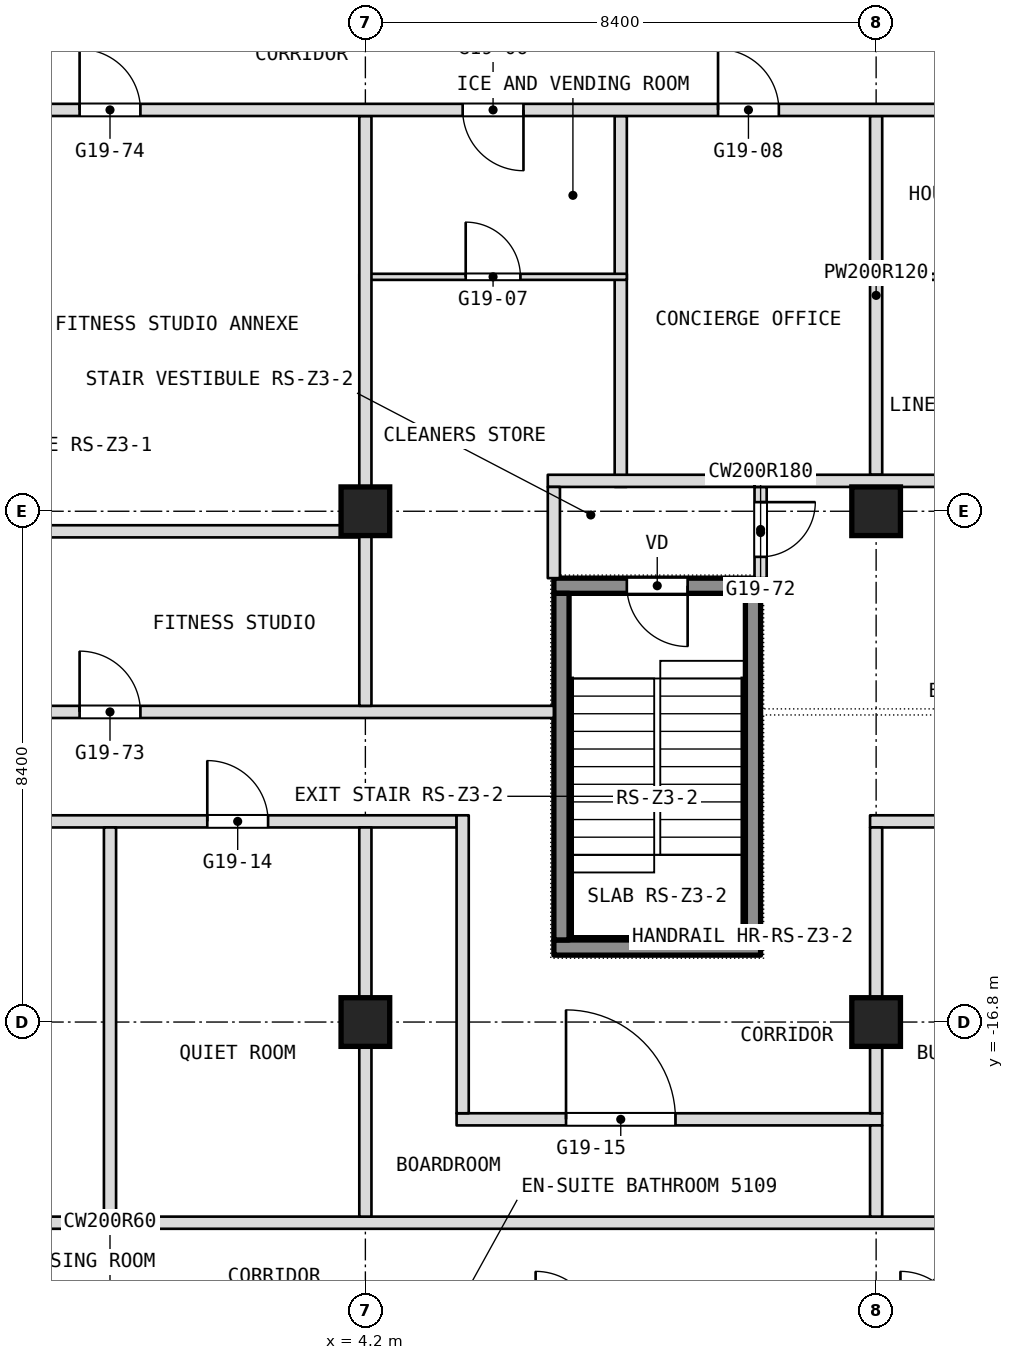
"""IFC4 building model, lengths in metres.
Left out: names, types, materials, properties, quantities, classifications, styles, units other than length and angle.
Written with IfcOpenShell. Run it as: python <this file> out.ifc"""

import sys

from ifc_helpers import new_model, si_unit, direction, frame, frame_2d, origin, origin_2d, place, context, subcontext, project, spatial, rectangle, extrude, element, fill, save


model = new_model("IFC4")
c1 = context("Model", 3, precision=1e-05, world=origin(), true_north=direction((0.0, 1.0)))
c2 = subcontext(c1, "Body", "Model", "MODEL_VIEW")
j1 = project(units=[si_unit("LENGTHUNIT", "METRE"), si_unit("PLANEANGLEUNIT", "RADIAN")], contexts=[c1])
p1 = place(None, origin())
s1 = spatial("IfcSite", under=j1, at=p1, CompositionType="ELEMENT")
p2 = place(p1, origin())
s2 = spatial("IfcBuilding", under=s1, at=p2, CompositionType="ELEMENT")
p3 = place(p2, frame((0.0, 0.0, 220.1)))
s3 = spatial("IfcBuildingStorey", under=s2, at=p3, CompositionType="ELEMENT", Elevation=220.1)
for number, where, z_axis, x_axis in (
    (1, (4.2, -16.8, 0.0), (0.0, 0.0, 1.0), (1.0, 0.0, 0.0)),
    (2, (4.2, -8.4, 0.0), (0.0, 0.0, 1.0), (1.0, 0.0, 0.0)),
    (3, (12.6, -16.8, 0.0), (0.0, 0.0, 1.0), (1.0, 0.0, 0.0)),
    (4, (12.6, -8.4, 0.0), (0.0, 0.0, 1.0), (1.0, 0.0, 0.0)),
):
    element("IfcColumn", number, at=place(p3, frame(where, z_axis=z_axis, x_axis=x_axis)), inside=s3, PredefinedType="COLUMN", context=c2, shape_type="SweptSolid", body=[
        extrude(rectangle(XDim=0.8, YDim=0.8, at=origin_2d()), origin(), (0.0, 0.0, 1.0), 3.6),
    ])
p4 = place(p3, frame((-16.7, -20.1, 0.0), z_axis=(0.0, 0.0, 1.0), x_axis=(1.0, 0.0, 0.0)))
e5 = element("IfcWall", 5, at=p4, inside=s3, PredefinedType="PARTITIONING", context=c2, shape_type="SweptSolid", body=[
    extrude(rectangle(XDim=33.4, YDim=0.2, at=frame_2d((16.7, 0.0))), origin(), (0.0, 0.0, 1.0), 3.34),
])
p5 = place(p3, frame((5.7, -18.4, 0.0), z_axis=(0.0, 0.0, 1.0), x_axis=(1.0, 0.0, 0.0)))
e6 = element("IfcWall", 6, at=p5, inside=s3, PredefinedType="PARTITIONING", context=c2, shape_type="SweptSolid", body=[
    extrude(rectangle(XDim=7.0, YDim=0.2, at=frame_2d((3.5, 0.0))), origin(), (0.0, 0.0, 1.0), 3.34),
])
p6 = place(p5, frame((1.8, 0.0, 0.0)))
e7 = element("IfcOpeningElement", 7, at=p6, cuts=e6, PredefinedType="OPENING", context=c2, shape_type="SweptSolid", body=[
    extrude(rectangle(XDim=1.8, YDim=2.1, at=frame_2d((0.9, 1.05))), frame((0.0, 0.1, 0.0), z_axis=(0.0, -1.0, 0.0), x_axis=(1.0, 0.0, 0.0)), (0.0, 0.0, 1.0), 0.2),
])
p7 = place(p3, frame((-5.9, -13.5, 0.0), z_axis=(0.0, 0.0, 1.0), x_axis=(1.0, 0.0, 0.0)))
e8 = element("IfcWall", 8, at=p7, inside=s3, PredefinedType="PARTITIONING", context=c2, shape_type="SweptSolid", body=[
    extrude(rectangle(XDim=11.6, YDim=0.2, at=frame_2d((5.8, 0.0))), origin(), (0.0, 0.0, 1.0), 3.34),
])
p8 = place(p7, frame((3.3, 0.0, 0.0)))
e9 = element("IfcOpeningElement", 9, at=p8, cuts=e8, PredefinedType="OPENING", context=c2, shape_type="SweptSolid", body=[
    extrude(rectangle(XDim=1.0, YDim=2.1, at=frame_2d((0.5, 1.05))), frame((0.0, 0.1, 0.0), z_axis=(0.0, -1.0, 0.0), x_axis=(1.0, 0.0, 0.0)), (0.0, 0.0, 1.0), 0.2),
])
p9 = place(p7, frame((7.5, 0.0, 0.0)))
e10 = element("IfcOpeningElement", 10, at=p9, cuts=e8, PredefinedType="OPENING", context=c2, shape_type="SweptSolid", body=[
    extrude(rectangle(XDim=1.0, YDim=2.1, at=frame_2d((0.5, 1.05))), frame((0.0, 0.1, 0.0), z_axis=(0.0, -1.0, 0.0), x_axis=(1.0, 0.0, 0.0)), (0.0, 0.0, 1.0), 0.2),
])
p10 = place(p3, frame((12.5, -13.5, 0.0), z_axis=(0.0, 0.0, 1.0), x_axis=(1.0, 0.0, 0.0)))
e11 = element("IfcWall", 11, at=p10, inside=s3, PredefinedType="PARTITIONING", context=c2, shape_type="SweptSolid", body=[
    extrude(rectangle(XDim=4.2, YDim=0.2, at=frame_2d((2.1, 0.0))), origin(), (0.0, 0.0, 1.0), 3.34),
])
p11 = place(p10, frame((1.7, 0.0, 0.0)))
e12 = element("IfcOpeningElement", 12, at=p11, cuts=e11, PredefinedType="OPENING", context=c2, shape_type="SweptSolid", body=[
    extrude(rectangle(XDim=1.0, YDim=2.1, at=frame_2d((0.5, 1.05))), frame((0.0, 0.1, 0.0), z_axis=(0.0, -1.0, 0.0), x_axis=(1.0, 0.0, 0.0)), (0.0, 0.0, 1.0), 0.2),
])
p12 = place(p3, frame((12.6, -20.0, 0.0), z_axis=(0.0, 0.0, 1.0), x_axis=(0.0, 1.0, 0.0)))
e13 = element("IfcWall", 13, at=p12, inside=s3, PredefinedType="PARTITIONING", context=c2, shape_type="SweptSolid", body=[
    extrude(rectangle(XDim=1.5, YDim=0.2, at=frame_2d((0.75, 0.0))), origin(), (0.0, 0.0, 1.0), 3.34),
])
p13 = place(p3, frame((12.6, -7.8, 0.0), z_axis=(0.0, 0.0, 1.0), x_axis=(0.0, 1.0, 0.0)))
e14 = element("IfcWall", 14, at=p13, inside=s3, PredefinedType="PARTITIONING", context=c2, shape_type="SweptSolid", body=[
    extrude(rectangle(XDim=5.9, YDim=0.2, at=frame_2d((2.95, 0.0))), origin(), (0.0, 0.0, 1.0), 3.34),
])
p14 = place(p3, frame((12.6, -18.3, 0.0), z_axis=(0.0, 0.0, 1.0), x_axis=(0.0, 1.0, 0.0)))
e15 = element("IfcWall", 15, at=p14, inside=s3, PredefinedType="PARTITIONING", context=c2, shape_type="SweptSolid", body=[
    extrude(rectangle(XDim=4.7, YDim=0.2, at=frame_2d((2.35, 0.0))), origin(), (0.0, 0.0, 1.0), 3.34),
])
p15 = place(p3, frame((-7.3, -11.7, 0.0), z_axis=(0.0, 0.0, 1.0), x_axis=(1.0, 0.0, 0.0)))
e16 = element("IfcWall", 16, at=p15, inside=s3, PredefinedType="PARTITIONING", context=c2, shape_type="SweptSolid", body=[
    extrude(rectangle(XDim=14.6, YDim=0.2, at=frame_2d((7.3, 0.0))), origin(), (0.0, 0.0, 1.0), 3.34),
])
p16 = place(p15, frame((6.8, 0.0, 0.0)))
e17 = element("IfcOpeningElement", 17, at=p16, cuts=e16, PredefinedType="OPENING", context=c2, shape_type="SweptSolid", body=[
    extrude(rectangle(XDim=1.0, YDim=2.1, at=frame_2d((0.5, 1.05))), frame((0.0, 0.1, 0.0), z_axis=(0.0, -1.0, 0.0), x_axis=(1.0, 0.0, 0.0)), (0.0, 0.0, 1.0), 0.2),
])
p17 = place(p3, frame((10.7, -9.5, 0.0), z_axis=(0.0, 0.0, 1.0), x_axis=(0.0, 1.0, 0.0)))
e18 = element("IfcWall", 18, at=p17, inside=s3, PredefinedType="PARTITIONING", context=c2, shape_type="SweptSolid", body=[
    extrude(rectangle(XDim=1.5, YDim=0.2, at=frame_2d((0.75, 0.0))), origin(), (0.0, 0.0, 1.0), 3.34),
])
p18 = place(p17, frame((0.35, 0.0, 0.0)))
e19 = element("IfcOpeningElement", 19, at=p18, cuts=e18, PredefinedType="OPENING", context=c2, shape_type="SweptSolid", body=[
    extrude(rectangle(XDim=0.9, YDim=2.1, at=frame_2d((0.45, 1.05))), frame((0.0, 0.1, 0.0), z_axis=(0.0, -1.0, 0.0), x_axis=(1.0, 0.0, 0.0)), (0.0, 0.0, 1.0), 0.2),
])
p19 = place(p3, frame((-4.1, -8.73, 0.0), z_axis=(0.0, 0.0, 1.0), x_axis=(1.0, 0.0, 0.0)))
e20 = element("IfcWall", 20, at=p19, inside=s3, PredefinedType="PARTITIONING", context=c2, shape_type="SweptSolid", body=[
    extrude(rectangle(XDim=8.2, YDim=0.2, at=frame_2d((4.1, 0.0))), origin(), (0.0, 0.0, 1.0), 3.34),
])
p20 = place(p3, frame((8.4, -8.0, 0.0), z_axis=(0.0, 0.0, 1.0), x_axis=(0.0, 1.0, 0.0)))
e21 = element("IfcWall", 21, at=p20, inside=s3, PredefinedType="PARTITIONING", context=c2, shape_type="SweptSolid", body=[
    extrude(rectangle(XDim=6.1, YDim=0.2, at=frame_2d((3.05, 0.0))), origin(), (0.0, 0.0, 1.0), 3.34),
])
p21 = place(p3, frame((10.6, -7.9, 0.0), z_axis=(0.0, 0.0, 1.0), x_axis=(1.0, 0.0, 0.0)))
e22 = element("IfcWall", 22, at=p21, inside=s3, PredefinedType="PARTITIONING", context=c2, shape_type="SweptSolid", body=[
    extrude(rectangle(XDim=6.3, YDim=0.2, at=frame_2d((3.15, 0.0))), origin(), (0.0, 0.0, 1.0), 3.34),
])
p22 = place(p3, frame((7.2, -7.9, 0.0), z_axis=(0.0, 0.0, 1.0), x_axis=(1.0, 0.0, 0.0)))
e23 = element("IfcWall", 23, at=p22, inside=s3, PredefinedType="PARTITIONING", context=c2, shape_type="SweptSolid", body=[
    extrude(rectangle(XDim=3.4, YDim=0.2, at=frame_2d((1.7, 0.0))), origin(), (0.0, 0.0, 1.0), 3.34),
])
p23 = place(p3, frame((7.3, -9.5, 0.0), z_axis=(0.0, 0.0, 1.0), x_axis=(0.0, 1.0, 0.0)))
e24 = element("IfcWall", 24, at=p23, inside=s3, PredefinedType="PARTITIONING", context=c2, shape_type="SweptSolid", body=[
    extrude(rectangle(XDim=1.5, YDim=0.2, at=frame_2d((0.75, 0.0))), origin(), (0.0, 0.0, 1.0), 3.34),
])
p24 = place(p3, frame((5.8, -18.3, 0.0), z_axis=(0.0, 0.0, 1.0), x_axis=(0.0, 1.0, 0.0)))
e25 = element("IfcWall", 25, at=p24, inside=s3, PredefinedType="PARTITIONING", context=c2, shape_type="SweptSolid", body=[
    extrude(rectangle(XDim=4.9, YDim=0.2, at=frame_2d((2.45, 0.0))), origin(), (0.0, 0.0, 1.0), 3.34),
])
p25 = place(p3, frame((4.1, -4.545, 0.0), z_axis=(0.0, 0.0, 1.0), x_axis=(1.0, 0.0, 0.0)))
e26 = element("IfcWall", 26, at=p25, inside=s3, PredefinedType="PARTITIONING", context=c2, shape_type="SweptSolid", body=[
    extrude(rectangle(XDim=4.4, YDim=0.1, at=frame_2d((2.2, 0.0))), origin(), (0.0, 0.0, 1.0), 3.34),
])
p26 = place(p25, frame((1.75, 0.0, 0.0)))
e27 = element("IfcOpeningElement", 27, at=p26, cuts=e26, PredefinedType="OPENING", context=c2, shape_type="SweptSolid", body=[
    extrude(rectangle(XDim=0.9, YDim=2.1, at=frame_2d((0.45, 1.05))), frame((0.0, 0.05, 0.0), z_axis=(0.0, -1.0, 0.0), x_axis=(1.0, 0.0, 0.0)), (0.0, 0.0, 1.0), 0.1),
])
p27 = place(p3, frame((12.7, -4.545, 0.0), z_axis=(0.0, 0.0, 1.0), x_axis=(1.0, 0.0, 0.0)))
e28 = element("IfcWall", 28, at=p27, inside=s3, PredefinedType="PARTITIONING", context=c2, shape_type="SweptSolid", body=[
    extrude(rectangle(XDim=4.0, YDim=0.1, at=frame_2d((2.0, 0.0))), origin(), (0.0, 0.0, 1.0), 3.34),
])
p28 = place(p27, frame((1.55, 0.0, 0.0)))
e29 = element("IfcOpeningElement", 29, at=p28, cuts=e28, PredefinedType="OPENING", context=c2, shape_type="SweptSolid", body=[
    extrude(rectangle(XDim=0.9, YDim=2.1, at=frame_2d((0.45, 1.05))), frame((0.0, 0.05, 0.0), z_axis=(0.0, -1.0, 0.0), x_axis=(1.0, 0.0, 0.0)), (0.0, 0.0, 1.0), 0.1),
])
p29 = place(p3, frame((4.2, -20.0, 0.0), z_axis=(0.0, 0.0, 1.0), x_axis=(0.0, 1.0, 0.0)))
e30 = element("IfcWall", 30, at=p29, inside=s3, PredefinedType="PARTITIONING", context=c2, shape_type="SweptSolid", body=[
    extrude(rectangle(XDim=6.4, YDim=0.2, at=frame_2d((3.2, 0.0))), origin(), (0.0, 0.0, 1.0), 3.34),
])
p30 = place(p3, frame((4.2, -11.6, 0.0), z_axis=(0.0, 0.0, 1.0), x_axis=(0.0, 1.0, 0.0)))
e31 = element("IfcWall", 31, at=p30, inside=s3, PredefinedType="PARTITIONING", context=c2, shape_type="SweptSolid", body=[
    extrude(rectangle(XDim=9.7, YDim=0.2, at=frame_2d((4.85, 0.0))), origin(), (0.0, 0.0, 1.0), 3.34),
])
p31 = place(p3, frame((-16.9, -1.8, 0.0), z_axis=(0.0, 0.0, 1.0), x_axis=(1.0, 0.0, 0.0)))
e32 = element("IfcWall", 32, at=p31, inside=s3, PredefinedType="PARTITIONING", context=c2, shape_type="SweptSolid", body=[
    extrude(rectangle(XDim=33.8, YDim=0.2, at=frame_2d((16.9, 0.0))), origin(), (0.0, 0.0, 1.0), 3.34),
])
p32 = place(p31, frame((1.7, 0.0, 0.0)))
e33 = element("IfcOpeningElement", 33, at=p32, cuts=e32, PredefinedType="OPENING", context=c2, shape_type="SweptSolid", body=[
    extrude(rectangle(XDim=1.0, YDim=2.1, at=frame_2d((0.5, 1.05))), frame((0.0, 0.1, 0.0), z_axis=(0.0, -1.0, 0.0), x_axis=(1.0, 0.0, 0.0)), (0.0, 0.0, 1.0), 0.2),
])
p33 = place(p31, frame((5.9, 0.0, 0.0)))
e34 = element("IfcOpeningElement", 34, at=p33, cuts=e32, PredefinedType="OPENING", context=c2, shape_type="SweptSolid", body=[
    extrude(rectangle(XDim=1.0, YDim=2.1, at=frame_2d((0.5, 1.05))), frame((0.0, 0.1, 0.0), z_axis=(0.0, -1.0, 0.0), x_axis=(1.0, 0.0, 0.0)), (0.0, 0.0, 1.0), 0.2),
])
p34 = place(p31, frame((10.1, 0.0, 0.0)))
e35 = element("IfcOpeningElement", 35, at=p34, cuts=e32, PredefinedType="OPENING", context=c2, shape_type="SweptSolid", body=[
    extrude(rectangle(XDim=1.0, YDim=2.1, at=frame_2d((0.5, 1.05))), frame((0.0, 0.1, 0.0), z_axis=(0.0, -1.0, 0.0), x_axis=(1.0, 0.0, 0.0)), (0.0, 0.0, 1.0), 0.2),
])
p35 = place(p31, frame((22.7, 0.0, 0.0)))
e36 = element("IfcOpeningElement", 36, at=p35, cuts=e32, PredefinedType="OPENING", context=c2, shape_type="SweptSolid", body=[
    extrude(rectangle(XDim=1.0, YDim=2.1, at=frame_2d((0.5, 1.05))), frame((0.0, 0.1, 0.0), z_axis=(0.0, -1.0, 0.0), x_axis=(1.0, 0.0, 0.0)), (0.0, 0.0, 1.0), 0.2),
])
p36 = place(p31, frame((26.9, 0.0, 0.0)))
e37 = element("IfcOpeningElement", 37, at=p36, cuts=e32, PredefinedType="OPENING", context=c2, shape_type="SweptSolid", body=[
    extrude(rectangle(XDim=1.0, YDim=2.1, at=frame_2d((0.5, 1.05))), frame((0.0, 0.1, 0.0), z_axis=(0.0, -1.0, 0.0), x_axis=(1.0, 0.0, 0.0)), (0.0, 0.0, 1.0), 0.2),
])
p37 = place(p31, frame((31.1, 0.0, 0.0)))
e38 = element("IfcOpeningElement", 38, at=p37, cuts=e32, PredefinedType="OPENING", context=c2, shape_type="SweptSolid", body=[
    extrude(rectangle(XDim=1.0, YDim=2.1, at=frame_2d((0.5, 1.05))), frame((0.0, 0.1, 0.0), z_axis=(0.0, -1.0, 0.0), x_axis=(1.0, 0.0, 0.0)), (0.0, 0.0, 1.0), 0.2),
])
p38 = place(p31, frame((16.4, 0.0, 0.0)))
e39 = element("IfcOpeningElement", 39, at=p38, cuts=e32, PredefinedType="OPENING", context=c2, shape_type="SweptSolid", body=[
    extrude(rectangle(XDim=1.0, YDim=2.1, at=frame_2d((0.5, 1.05))), frame((0.0, 0.1, 0.0), z_axis=(0.0, -1.0, 0.0), x_axis=(1.0, 0.0, 0.0)), (0.0, 0.0, 1.0), 0.2),
])
p39 = place(p3, frame((0.0, -20.0, 0.0), z_axis=(0.0, 0.0, 1.0), x_axis=(0.0, 1.0, 0.0)))
e40 = element("IfcWall", 40, at=p39, inside=s3, PredefinedType="PARTITIONING", context=c2, shape_type="SweptSolid", body=[
    extrude(rectangle(XDim=6.4, YDim=0.2, at=frame_2d((3.2, 0.0))), origin(), (0.0, 0.0, 1.0), 3.34),
])
p40 = place(p3, frame((7.3, -15.575, 0.1), z_axis=(0.0, 0.0, 1.0), x_axis=(1.0, 0.0, 0.0)))
e41 = element("IfcWall", 41, at=p40, inside=s3, PredefinedType="SHEAR", context=c2, shape_type="SweptSolid", body=[
    extrude(rectangle(XDim=3.4, YDim=0.25, at=frame_2d((1.7, 0.0))), origin(), (0.0, 0.0, 1.0), 3.6),
])
p41 = place(p3, frame((7.3, -9.625, 0.1), z_axis=(0.0, 0.0, 1.0), x_axis=(1.0, 0.0, 0.0)))
e42 = element("IfcWall", 42, at=p41, inside=s3, PredefinedType="SHEAR", context=c2, shape_type="SweptSolid", body=[
    extrude(rectangle(XDim=3.4, YDim=0.25, at=frame_2d((1.7, 0.0))), origin(), (0.0, 0.0, 1.0), 3.6),
])
p42 = place(p41, frame((1.2, 0.0, 0.0)))
e43 = element("IfcOpeningElement", 43, at=p42, cuts=e42, PredefinedType="OPENING", context=c2, shape_type="SweptSolid", body=[
    extrude(rectangle(XDim=1.0, YDim=2.1, at=frame_2d((0.5, 1.05))), frame((0.0, 0.125, 0.0), z_axis=(0.0, -1.0, 0.0), x_axis=(1.0, 0.0, 0.0)), (0.0, 0.0, 1.0), 0.25),
])
for number, where, z_axis, x_axis in (
    (44, (7.425, -15.45, 0.1), (0.0, 0.0, 1.0), (0.0, 1.0, 0.0)),
    (45, (10.575, -15.45, 0.1), (0.0, 0.0, 1.0), (0.0, 1.0, 0.0)),
):
    element("IfcWall", number, at=place(p3, frame(where, z_axis=z_axis, x_axis=x_axis)), inside=s3, PredefinedType="SHEAR", context=c2, shape_type="SweptSolid", body=[
        extrude(rectangle(XDim=5.7, YDim=0.25, at=frame_2d((2.85, 0.0))), origin(), (0.0, 0.0, 1.0), 3.6),
    ])
p43 = place(p6, origin())
e46 = element("IfcDoor", 46, at=p43, inside=s3, OperationType="DOUBLE_DOOR_SINGLE_SWING", PredefinedType="DOOR", context=c2, shape_type="SweptSolid", body=[
    extrude(rectangle(XDim=1.8, YDim=2.1, at=frame_2d((0.9, 1.05))), frame((0.0, 0.025, 0.0), z_axis=(0.0, -1.0, 0.0), x_axis=(1.0, 0.0, 0.0)), (0.0, 0.0, 1.0), 0.05),
])
fill(e7, e46)
p44 = place(p9, origin())
e47 = element("IfcDoor", 47, at=p44, inside=s3, OperationType="SINGLE_SWING_RIGHT", PredefinedType="DOOR", context=c2, shape_type="SweptSolid", body=[
    extrude(rectangle(XDim=1.0, YDim=2.1, at=frame_2d((0.5, 1.05))), frame((0.0, 0.025, 0.0), z_axis=(0.0, -1.0, 0.0), x_axis=(1.0, 0.0, 0.0)), (0.0, 0.0, 1.0), 0.05),
])
fill(e10, e47)
p45 = place(p16, origin())
e48 = element("IfcDoor", 48, at=p45, inside=s3, OperationType="SINGLE_SWING_LEFT", PredefinedType="DOOR", context=c2, shape_type="SweptSolid", body=[
    extrude(rectangle(XDim=1.0, YDim=2.1, at=frame_2d((0.5, 1.05))), frame((0.0, 0.025, 0.0), z_axis=(0.0, -1.0, 0.0), x_axis=(1.0, 0.0, 0.0)), (0.0, 0.0, 1.0), 0.05),
])
fill(e17, e48)
p46 = place(p18, origin())
e49 = element("IfcDoor", 49, at=p46, inside=s3, OperationType="SINGLE_SWING_RIGHT", PredefinedType="DOOR", context=c2, shape_type="SweptSolid", body=[
    extrude(rectangle(XDim=0.9, YDim=2.1, at=frame_2d((0.45, 1.05))), frame((0.0, 0.025, 0.0), z_axis=(0.0, -1.0, 0.0), x_axis=(1.0, 0.0, 0.0)), (0.0, 0.0, 1.0), 0.05),
])
fill(e19, e49)
p47 = place(p26, origin())
e50 = element("IfcDoor", 50, at=p47, inside=s3, OperationType="SINGLE_SWING_LEFT", PredefinedType="DOOR", context=c2, shape_type="SweptSolid", body=[
    extrude(rectangle(XDim=0.9, YDim=2.1, at=frame_2d((0.45, 1.05))), frame((0.0, 0.025, 0.0), z_axis=(0.0, -1.0, 0.0), x_axis=(1.0, 0.0, 0.0)), (0.0, 0.0, 1.0), 0.05),
])
fill(e27, e50)
p48 = place(p35, origin())
e51 = element("IfcDoor", 51, at=p48, inside=s3, OperationType="SINGLE_SWING_RIGHT", PredefinedType="DOOR", context=c2, shape_type="SweptSolid", body=[
    extrude(rectangle(XDim=1.0, YDim=2.1, at=frame_2d((0.5, 1.05))), frame((0.0, 0.025, 0.0), z_axis=(0.0, -1.0, 0.0), x_axis=(1.0, 0.0, 0.0)), (0.0, 0.0, 1.0), 0.05),
])
fill(e36, e51)
p49 = place(p36, origin())
e52 = element("IfcDoor", 52, at=p49, inside=s3, OperationType="SINGLE_SWING_LEFT", PredefinedType="DOOR", context=c2, shape_type="SweptSolid", body=[
    extrude(rectangle(XDim=1.0, YDim=2.1, at=frame_2d((0.5, 1.05))), frame((0.0, 0.025, 0.0), z_axis=(0.0, -1.0, 0.0), x_axis=(1.0, 0.0, 0.0)), (0.0, 0.0, 1.0), 0.05),
])
fill(e37, e52)
p50 = place(p38, origin())
e53 = element("IfcDoor", 53, at=p50, inside=s3, OperationType="SINGLE_SWING_LEFT", PredefinedType="DOOR", context=c2, shape_type="SweptSolid", body=[
    extrude(rectangle(XDim=1.0, YDim=2.1, at=frame_2d((0.5, 1.05))), frame((0.0, 0.025, 0.0), z_axis=(0.0, -1.0, 0.0), x_axis=(1.0, 0.0, 0.0)), (0.0, 0.0, 1.0), 0.05),
])
fill(e39, e53)
p51 = place(p42, origin())
e54 = element("IfcDoor", 54, at=p51, inside=s3, OperationType="SINGLE_SWING_LEFT", PredefinedType="DOOR", context=c2, shape_type="SweptSolid", body=[
    extrude(rectangle(XDim=1.0, YDim=2.1, at=frame_2d((0.5, 1.05))), frame((0.0, 0.025, 0.0), z_axis=(0.0, -1.0, 0.0), x_axis=(1.0, 0.0, 0.0)), (0.0, 0.0, 1.0), 0.05),
])
fill(e43, e54)
save(model, sys.argv[1])
